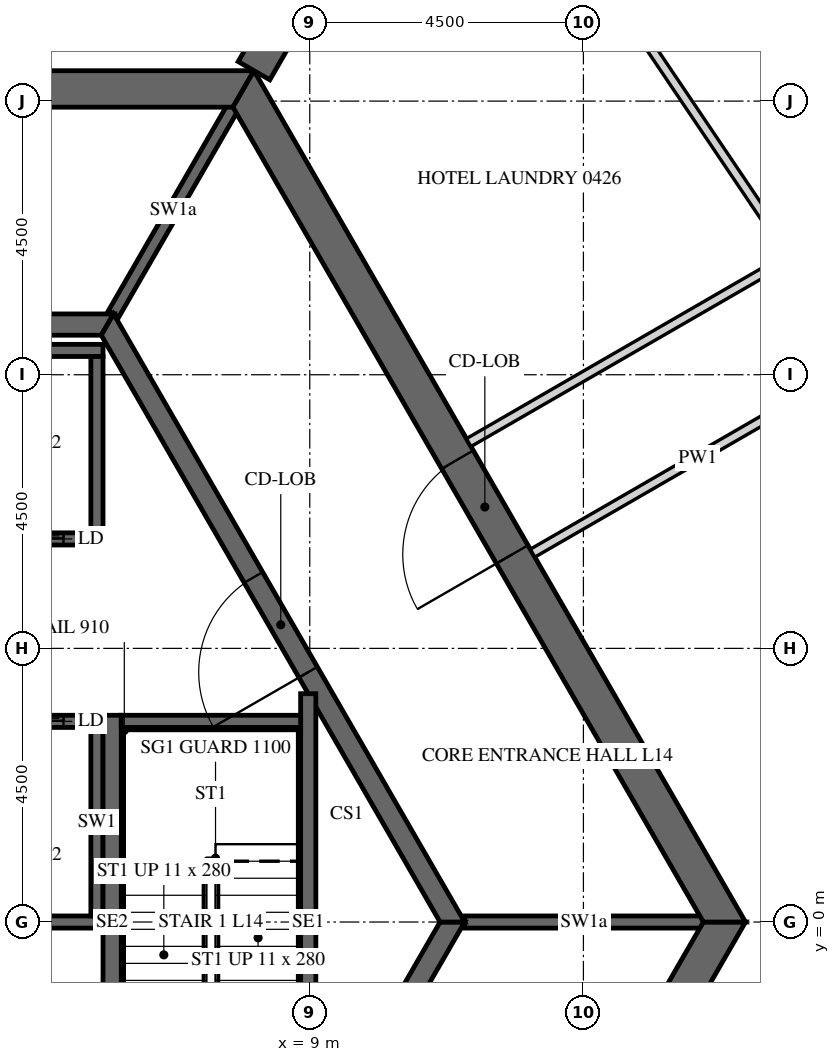
"""IFC4 building model, lengths in metres.
Left out: names, types, materials, properties, quantities, classifications, styles, units other than length and angle.
Written with IfcOpenShell. Run it as: python <this file> out.ifc"""

import sys

from ifc_helpers import new_model, si_unit, direction, frame, frame_2d, origin, place, context, subcontext, project, spatial, polyline, rectangle, outline, extrude, element, fill, save


model = new_model("IFC4")
c1 = context("Model", 3, precision=1e-05, world=origin(), true_north=direction((0.0, 1.0)))
c2 = subcontext(c1, "Body", "Model", "MODEL_VIEW")
j1 = project(units=[si_unit("LENGTHUNIT", "METRE"), si_unit("PLANEANGLEUNIT", "RADIAN")], contexts=[c1])
p1 = place(None, origin())
s1 = spatial("IfcSite", under=j1, at=p1, CompositionType="ELEMENT")
p2 = place(p1, origin())
s2 = spatial("IfcBuilding", under=s1, at=p2, CompositionType="ELEMENT")
p3 = place(p2, frame((0.0, 0.0, 68.7)))
s3 = spatial("IfcBuildingStorey", under=s2, at=p3, CompositionType="ELEMENT", Elevation=68.7)
p4 = place(p3, frame((7.91, -13.7, -0.15), z_axis=(0.0, 0.0, 1.0), x_axis=(0.499999880136, 0.866025472988, 0.0)))
e1 = element("IfcWall", 1, at=p4, inside=s3, PredefinedType="SHEAR", context=c2, shape_type="SweptSolid", body=[
    extrude(outline(polyline([(-0.173, -0.3), (15.993, -0.3), (15.646, 0.3), (0.173, 0.3), (-0.173, -0.3)])), origin(), (0.0, 0.0, 1.0), 3.9),
])
p5 = place(p4, frame((7.039, 0.0, 0.15)))
e2 = element("IfcOpeningElement", 2, at=p5, cuts=e1, PredefinedType="OPENING", context=c2, shape_type="SweptSolid", body=[
    extrude(rectangle(XDim=1.8, YDim=2.4, at=frame_2d((0.9, 1.2))), frame((0.0, 0.31, 0.0), z_axis=(0.0, -1.0, 0.0), x_axis=(1.0, 0.0, 0.0)), (0.0, 0.0, 1.0), 0.62),
])
p6 = place(p3, frame((15.819, 0.0, -0.15), z_axis=(0.0, 0.0, 1.0), x_axis=(-0.499999880136, 0.866025472988, 0.0)))
e3 = element("IfcWall", 3, at=p6, inside=s3, PredefinedType="SHEAR", context=c2, shape_type="SweptSolid", body=[
    extrude(outline(polyline([(-0.173, -0.3), (15.993, -0.3), (15.646, 0.3), (0.173, 0.3), (-0.173, -0.3)])), origin(), (0.0, 0.0, 1.0), 3.9),
])
p7 = place(p6, frame((6.981, 0.0, 0.15)))
e4 = element("IfcOpeningElement", 4, at=p7, cuts=e3, PredefinedType="OPENING", context=c2, shape_type="SweptSolid", body=[
    extrude(rectangle(XDim=1.8, YDim=2.4, at=frame_2d((0.9, 1.2))), frame((0.0, 0.31, 0.0), z_axis=(0.0, -1.0, 0.0), x_axis=(1.0, 0.0, 0.0)), (0.0, 0.0, 1.0), 0.62),
])
p8 = place(p3, frame((7.91, 13.7, -0.15), z_axis=(0.0, 0.0, 1.0), x_axis=(-1.0, 0.0, 0.0)))
e5 = element("IfcWall", 5, at=p8, inside=s3, PredefinedType="SHEAR", context=c2, shape_type="SweptSolid", body=[
    extrude(outline(polyline([(-0.173, -0.3), (15.993, -0.3), (15.646, 0.3), (0.173, 0.3), (-0.173, -0.3)])), origin(), (0.0, 0.0, 1.0), 3.9),
])
p9 = place(p8, frame((7.31, 0.0, 0.15)))
e6 = element("IfcOpeningElement", 6, at=p9, cuts=e5, PredefinedType="OPENING", context=c2, shape_type="SweptSolid", body=[
    extrude(rectangle(XDim=1.2, YDim=2.4, at=frame_2d((0.6, 1.2))), frame((0.0, 0.31, 0.0), z_axis=(0.0, -1.0, 0.0), x_axis=(1.0, 0.0, 0.0)), (0.0, 0.0, 1.0), 0.62),
])
p10 = place(p3, frame((8.083, 14.0, -0.15), z_axis=(0.0, 0.0, 1.0), x_axis=(0.499997680643, 0.866026742862, 0.0)))
e7 = element("IfcWall", 7, at=p10, inside=s3, PredefinedType="SHEAR", context=c2, shape_type="SweptSolid", body=[
    extrude(rectangle(XDim=16.509, YDim=0.6, at=frame_2d((8.254, 0.0))), origin(), (0.0, 0.0, 1.0), 3.9),
])
p11 = place(p10, frame((7.354, 0.0, 0.15)))
e8 = element("IfcOpeningElement", 8, at=p11, cuts=e7, PredefinedType="OPENING", context=c2, shape_type="SweptSolid", body=[
    extrude(rectangle(XDim=1.8, YDim=2.4, at=frame_2d((0.9, 1.2))), frame((0.0, 0.31, 0.0), z_axis=(0.0, -1.0, 0.0), x_axis=(1.0, 0.0, 0.0)), (0.0, 0.0, 1.0), 0.62),
])
p12 = place(p3, frame((5.673, -9.825, -0.15), z_axis=(0.0, 0.0, 1.0), x_axis=(0.499995046907, 0.866028263435, 0.0)))
e9 = element("IfcWall", 9, at=p12, inside=s3, PredefinedType="SHEAR", context=c2, shape_type="SweptSolid", body=[
    extrude(outline(polyline([(-0.101, -0.175), (11.446, -0.175), (11.244, 0.175), (0.101, 0.175), (-0.101, -0.175)])), origin(), (0.0, 0.0, 1.0), 3.9),
])
p13 = place(p12, frame((4.801, 0.0, 0.15)))
e10 = element("IfcOpeningElement", 10, at=p13, cuts=e9, PredefinedType="OPENING", context=c2, shape_type="SweptSolid", body=[
    extrude(rectangle(XDim=1.8, YDim=2.4, at=frame_2d((0.9, 1.2))), frame((0.0, 0.185, 0.0), z_axis=(0.0, -1.0, 0.0), x_axis=(1.0, 0.0, 0.0)), (0.0, 0.0, 1.0), 0.37),
])
p14 = place(p3, frame((11.345, 0.0, -0.15), z_axis=(0.0, 0.0, 1.0), x_axis=(-0.499995046907, 0.866028263435, 0.0)))
e11 = element("IfcWall", 11, at=p14, inside=s3, PredefinedType="SHEAR", context=c2, shape_type="SweptSolid", body=[
    extrude(outline(polyline([(-0.101, -0.175), (11.446, -0.175), (11.244, 0.175), (0.101, 0.175), (-0.101, -0.175)])), origin(), (0.0, 0.0, 1.0), 3.9),
])
p15 = place(p14, frame((4.744, 0.0, 0.15)))
e12 = element("IfcOpeningElement", 12, at=p15, cuts=e11, PredefinedType="OPENING", context=c2, shape_type="SweptSolid", body=[
    extrude(rectangle(XDim=1.8, YDim=2.4, at=frame_2d((0.9, 1.2))), frame((0.0, 0.185, 0.0), z_axis=(0.0, -1.0, 0.0), x_axis=(1.0, 0.0, 0.0)), (0.0, 0.0, 1.0), 0.37),
])
p16 = place(p3, frame((5.673, 9.825, -0.15), z_axis=(0.0, 0.0, 1.0), x_axis=(-1.0, 0.0, 0.0)))
e13 = element("IfcWall", 13, at=p16, inside=s3, PredefinedType="SHEAR", context=c2, shape_type="SweptSolid", body=[
    extrude(outline(polyline([(-0.101, -0.175), (11.446, -0.175), (11.244, 0.175), (0.101, 0.175), (-0.101, -0.175)])), origin(), (0.0, 0.0, 1.0), 3.9),
])
p17 = place(p3, frame((-5.6, 6.3, -0.25), z_axis=(0.0, 0.0, 1.0), x_axis=(1.0, 0.0, 0.0)))
e14 = element("IfcWall", 14, at=p17, inside=s3, PredefinedType="SHEAR", context=c2, shape_type="SweptSolid", body=[
    extrude(rectangle(XDim=11.2, YDim=0.2, at=frame_2d((5.6, 0.0))), origin(), (0.0, 0.0, 1.0), 3.9),
])
p18 = place(p17, frame((0.65, 0.0, 0.25)))
e15 = element("IfcOpeningElement", 15, at=p18, cuts=e14, PredefinedType="OPENING", context=c2, shape_type="SweptSolid", body=[
    extrude(rectangle(XDim=1.1, YDim=2.1, at=frame_2d((0.55, 1.05))), frame((0.0, 0.11, 0.0), z_axis=(0.0, -1.0, 0.0), x_axis=(1.0, 0.0, 0.0)), (0.0, 0.0, 1.0), 0.22),
])
p19 = place(p17, frame((2.85, 0.0, 0.25)))
e16 = element("IfcOpeningElement", 16, at=p19, cuts=e14, PredefinedType="OPENING", context=c2, shape_type="SweptSolid", body=[
    extrude(rectangle(XDim=1.1, YDim=2.1, at=frame_2d((0.55, 1.05))), frame((0.0, 0.11, 0.0), z_axis=(0.0, -1.0, 0.0), x_axis=(1.0, 0.0, 0.0)), (0.0, 0.0, 1.0), 0.22),
])
p20 = place(p17, frame((5.05, 0.0, 0.25)))
e17 = element("IfcOpeningElement", 17, at=p20, cuts=e14, PredefinedType="OPENING", context=c2, shape_type="SweptSolid", body=[
    extrude(rectangle(XDim=1.1, YDim=2.1, at=frame_2d((0.55, 1.05))), frame((0.0, 0.11, 0.0), z_axis=(0.0, -1.0, 0.0), x_axis=(1.0, 0.0, 0.0)), (0.0, 0.0, 1.0), 0.22),
])
p21 = place(p17, frame((7.25, 0.0, 0.25)))
e18 = element("IfcOpeningElement", 18, at=p21, cuts=e14, PredefinedType="OPENING", context=c2, shape_type="SweptSolid", body=[
    extrude(rectangle(XDim=1.1, YDim=2.1, at=frame_2d((0.55, 1.05))), frame((0.0, 0.11, 0.0), z_axis=(0.0, -1.0, 0.0), x_axis=(1.0, 0.0, 0.0)), (0.0, 0.0, 1.0), 0.22),
])
p22 = place(p17, frame((9.45, 0.0, 0.25)))
e19 = element("IfcOpeningElement", 19, at=p22, cuts=e14, PredefinedType="OPENING", context=c2, shape_type="SweptSolid", body=[
    extrude(rectangle(XDim=1.1, YDim=2.1, at=frame_2d((0.55, 1.05))), frame((0.0, 0.11, 0.0), z_axis=(0.0, -1.0, 0.0), x_axis=(1.0, 0.0, 0.0)), (0.0, 0.0, 1.0), 0.22),
])
p23 = place(p3, frame((-5.6, 9.4, -0.25), z_axis=(0.0, 0.0, 1.0), x_axis=(1.0, 0.0, 0.0)))
e20 = element("IfcWall", 20, at=p23, inside=s3, PredefinedType="SHEAR", context=c2, shape_type="SweptSolid", body=[
    extrude(rectangle(XDim=11.2, YDim=0.2, at=frame_2d((5.6, 0.0))), origin(), (0.0, 0.0, 1.0), 3.9),
])
p24 = place(p3, frame((5.5, 6.4, -0.25), z_axis=(0.0, 0.0, 1.0), x_axis=(0.0, 1.0, 0.0)))
e21 = element("IfcWall", 21, at=p24, inside=s3, PredefinedType="SHEAR", context=c2, shape_type="SweptSolid", body=[
    extrude(rectangle(XDim=2.9, YDim=0.2, at=frame_2d((1.45, 0.0))), origin(), (0.0, 0.0, 1.0), 3.9),
])
p25 = place(p3, frame((-5.6, 3.3, -0.25), z_axis=(0.0, 0.0, 1.0), x_axis=(1.0, 0.0, 0.0)))
e22 = element("IfcWall", 22, at=p25, inside=s3, PredefinedType="SHEAR", context=c2, shape_type="SweptSolid", body=[
    extrude(rectangle(XDim=11.2, YDim=0.2, at=frame_2d((5.6, 0.0))), origin(), (0.0, 0.0, 1.0), 3.9),
])
p26 = place(p25, frame((0.65, 0.0, 0.25)))
e23 = element("IfcOpeningElement", 23, at=p26, cuts=e22, PredefinedType="OPENING", context=c2, shape_type="SweptSolid", body=[
    extrude(rectangle(XDim=1.1, YDim=2.1, at=frame_2d((0.55, 1.05))), frame((0.0, 0.11, 0.0), z_axis=(0.0, -1.0, 0.0), x_axis=(1.0, 0.0, 0.0)), (0.0, 0.0, 1.0), 0.22),
])
p27 = place(p25, frame((2.85, 0.0, 0.25)))
e24 = element("IfcOpeningElement", 24, at=p27, cuts=e22, PredefinedType="OPENING", context=c2, shape_type="SweptSolid", body=[
    extrude(rectangle(XDim=1.1, YDim=2.1, at=frame_2d((0.55, 1.05))), frame((0.0, 0.11, 0.0), z_axis=(0.0, -1.0, 0.0), x_axis=(1.0, 0.0, 0.0)), (0.0, 0.0, 1.0), 0.22),
])
p28 = place(p25, frame((5.05, 0.0, 0.25)))
e25 = element("IfcOpeningElement", 25, at=p28, cuts=e22, PredefinedType="OPENING", context=c2, shape_type="SweptSolid", body=[
    extrude(rectangle(XDim=1.1, YDim=2.1, at=frame_2d((0.55, 1.05))), frame((0.0, 0.11, 0.0), z_axis=(0.0, -1.0, 0.0), x_axis=(1.0, 0.0, 0.0)), (0.0, 0.0, 1.0), 0.22),
])
p29 = place(p25, frame((7.25, 0.0, 0.25)))
e26 = element("IfcOpeningElement", 26, at=p29, cuts=e22, PredefinedType="OPENING", context=c2, shape_type="SweptSolid", body=[
    extrude(rectangle(XDim=1.1, YDim=2.1, at=frame_2d((0.55, 1.05))), frame((0.0, 0.11, 0.0), z_axis=(0.0, -1.0, 0.0), x_axis=(1.0, 0.0, 0.0)), (0.0, 0.0, 1.0), 0.22),
])
p30 = place(p25, frame((9.45, 0.0, 0.25)))
e27 = element("IfcOpeningElement", 27, at=p30, cuts=e22, PredefinedType="OPENING", context=c2, shape_type="SweptSolid", body=[
    extrude(rectangle(XDim=1.1, YDim=2.1, at=frame_2d((0.55, 1.05))), frame((0.0, 0.11, 0.0), z_axis=(0.0, -1.0, 0.0), x_axis=(1.0, 0.0, 0.0)), (0.0, 0.0, 1.0), 0.22),
])
p31 = place(p3, frame((-5.6, 0.0, -0.25), z_axis=(0.0, 0.0, 1.0), x_axis=(1.0, 0.0, 0.0)))
e28 = element("IfcWall", 28, at=p31, inside=s3, PredefinedType="SHEAR", context=c2, shape_type="SweptSolid", body=[
    extrude(rectangle(XDim=11.2, YDim=0.2, at=frame_2d((5.6, 0.0))), origin(), (0.0, 0.0, 1.0), 3.9),
])
p32 = place(p3, frame((5.5, 0.1, -0.25), z_axis=(0.0, 0.0, 1.0), x_axis=(0.0, 1.0, 0.0)))
e29 = element("IfcWall", 29, at=p32, inside=s3, PredefinedType="SHEAR", context=c2, shape_type="SweptSolid", body=[
    extrude(rectangle(XDim=3.1, YDim=0.2, at=frame_2d((1.55, 0.0))), origin(), (0.0, 0.0, 1.0), 3.9),
])
p33 = place(p3, frame((11.547, 0.0, -0.15), z_axis=(0.0, 0.0, 1.0), x_axis=(1.0, 0.0, 0.0)))
e30 = element("IfcWall", 30, at=p33, inside=s3, PredefinedType="SHEAR", context=c2, shape_type="SweptSolid", body=[
    extrude(rectangle(XDim=3.926, YDim=0.2, at=frame_2d((1.963, 0.0))), origin(), (0.0, 0.0, 1.0), 3.9),
])
p34 = place(p3, frame((5.773, 10.0, -0.15), z_axis=(0.0, 0.0, 1.0), x_axis=(0.500038251005, 0.86600331843, 0.0)))
e31 = element("IfcWall", 31, at=p34, inside=s3, PredefinedType="SHEAR", context=c2, shape_type="SweptSolid", body=[
    extrude(rectangle(XDim=3.926, YDim=0.2, at=frame_2d((1.963, 0.0))), origin(), (0.0, 0.0, 1.0), 3.9),
])
p35 = place(p3, frame((5.75, -3.4, -0.25), z_axis=(0.0, 0.0, 1.0), x_axis=(0.0, 1.0, 0.0)))
e32 = element("IfcWall", 32, at=p35, inside=s3, PredefinedType="SHEAR", context=c2, shape_type="SweptSolid", body=[
    extrude(rectangle(XDim=6.8, YDim=0.3, at=frame_2d((3.4, 0.0))), origin(), (0.0, 0.0, 1.0), 3.9),
])
p36 = place(p3, frame((8.975, -3.755, -0.25), z_axis=(0.0, 0.0, 1.0), x_axis=(0.0, 1.0, 0.0)))
e33 = element("IfcWall", 33, at=p36, inside=s3, PredefinedType="SHEAR", context=c2, shape_type="SweptSolid", body=[
    extrude(rectangle(XDim=7.51, YDim=0.25, at=frame_2d((3.755, 0.0))), origin(), (0.0, 0.0, 1.0), 3.9),
])
p37 = place(p3, frame((5.9, 3.3, -0.25), z_axis=(0.0, 0.0, 1.0), x_axis=(1.0, 0.0, 0.0)))
e34 = element("IfcWall", 34, at=p37, inside=s3, PredefinedType="SHEAR", context=c2, shape_type="SweptSolid", body=[
    extrude(rectangle(XDim=2.95, YDim=0.2, at=frame_2d((1.475, 0.0))), origin(), (0.0, 0.0, 1.0), 3.9),
])
p38 = place(p3, frame((13.928, -19.775, 0.0), z_axis=(0.0, 0.0, 1.0), x_axis=(0.50000450071, 0.866022805283, 0.0)))
e35 = element("IfcWall", 35, at=p38, inside=s3, PredefinedType="PARTITIONING", context=c2, shape_type="SweptSolid", body=[
    extrude(rectangle(XDim=23.877, YDim=0.15, at=frame_2d((11.938, 0.0))), origin(), (0.0, 0.0, 1.0), 2.988),
])
p39 = place(p38, frame((3.943, 0.0, 0.0)))
e36 = element("IfcOpeningElement", 36, at=p39, cuts=e35, PredefinedType="OPENING", context=c2, shape_type="SweptSolid", body=[
    extrude(rectangle(XDim=1.0, YDim=2.1, at=frame_2d((0.5, 1.05))), frame((0.0, 0.085, 0.0), z_axis=(0.0, -1.0, 0.0), x_axis=(1.0, 0.0, 0.0)), (0.0, 0.0, 1.0), 0.17),
])
p40 = place(p38, frame((14.972, 0.0, 0.0)))
e37 = element("IfcOpeningElement", 37, at=p40, cuts=e35, PredefinedType="OPENING", context=c2, shape_type="SweptSolid", body=[
    extrude(rectangle(XDim=1.0, YDim=2.1, at=frame_2d((0.5, 1.05))), frame((0.0, 0.085, 0.0), z_axis=(0.0, -1.0, 0.0), x_axis=(1.0, 0.0, 0.0)), (0.0, 0.0, 1.0), 0.17),
])
p41 = place(p3, frame((25.821, 0.972, 0.0), z_axis=(0.0, 0.0, 1.0), x_axis=(-0.559193816298, 0.829036956845, 0.0)))
e38 = element("IfcWall", 38, at=p41, inside=s3, PredefinedType="PARTITIONING", context=c2, shape_type="SweptSolid", body=[
    extrude(rectangle(XDim=22.002, YDim=0.15, at=frame_2d((11.001, 0.0))), origin(), (0.0, 0.0, 1.0), 2.988),
])
p42 = place(p41, frame((3.269, 0.0, 0.0)))
e39 = element("IfcOpeningElement", 39, at=p42, cuts=e38, PredefinedType="OPENING", context=c2, shape_type="SweptSolid", body=[
    extrude(rectangle(XDim=1.0, YDim=2.1, at=frame_2d((0.5, 1.05))), frame((0.0, 0.085, 0.0), z_axis=(0.0, -1.0, 0.0), x_axis=(1.0, 0.0, 0.0)), (0.0, 0.0, 1.0), 0.17),
])
p43 = place(p41, frame((13.221, 0.0, 0.0)))
e40 = element("IfcOpeningElement", 40, at=p43, cuts=e38, PredefinedType="OPENING", context=c2, shape_type="SweptSolid", body=[
    extrude(rectangle(XDim=1.0, YDim=2.1, at=frame_2d((0.5, 1.05))), frame((0.0, 0.085, 0.0), z_axis=(0.0, -1.0, 0.0), x_axis=(1.0, 0.0, 0.0)), (0.0, 0.0, 1.0), 0.17),
])
p44 = place(p41, frame((20.852, 0.0, 0.0)))
e41 = element("IfcOpeningElement", 41, at=p44, cuts=e38, PredefinedType="OPENING", context=c2, shape_type="SweptSolid", body=[
    extrude(rectangle(XDim=1.0, YDim=2.1, at=frame_2d((0.5, 1.05))), frame((0.0, 0.085, 0.0), z_axis=(0.0, -1.0, 0.0), x_axis=(1.0, 0.0, 0.0)), (0.0, 0.0, 1.0), 0.17),
])
p45 = place(p3, frame((12.664, 6.066, 0.0), z_axis=(0.0, 0.0, 1.0), x_axis=(0.866036561919, 0.499980673046, 0.0)))
e42 = element("IfcWall", 42, at=p45, inside=s3, PredefinedType="PARTITIONING", context=c2, shape_type="SweptSolid", body=[
    extrude(rectangle(XDim=6.275, YDim=0.15, at=frame_2d((3.137, 0.0))), origin(), (0.0, 0.0, 1.0), 2.988),
])
p46 = place(p3, frame((11.465, 19.037, 0.0), z_axis=(0.0, 0.0, 1.0), x_axis=(0.559196064773, -0.829035440221, 0.0)))
e43 = element("IfcWall", 43, at=p46, inside=s3, PredefinedType="PARTITIONING", context=c2, shape_type="SweptSolid", body=[
    extrude(rectangle(XDim=9.757, YDim=0.15, at=frame_2d((4.878, 0.0))), origin(), (0.0, 0.0, 1.0), 2.988),
])
p47 = place(p46, frame((4.428, 0.0, 0.0)))
e44 = element("IfcOpeningElement", 44, at=p47, cuts=e43, PredefinedType="OPENING", context=c2, shape_type="SweptSolid", body=[
    extrude(rectangle(XDim=0.9, YDim=2.1, at=frame_2d((0.45, 1.05))), frame((0.0, 0.085, 0.0), z_axis=(0.0, -1.0, 0.0), x_axis=(1.0, 0.0, 0.0)), (0.0, 0.0, 1.0), 0.17),
])
p48 = place(p3, frame((16.855, 10.911, 0.0), z_axis=(0.0, 0.0, 1.0), x_axis=(-0.866020343444, -0.500008764664, 0.0)))
e45 = element("IfcWall", 45, at=p48, inside=s3, PredefinedType="PARTITIONING", context=c2, shape_type="SweptSolid", body=[
    extrude(rectangle(XDim=6.053, YDim=0.15, at=frame_2d((3.026, 0.0))), origin(), (0.0, 0.0, 1.0), 2.988),
])
p49 = place(p7, origin())
e46 = element("IfcDoor", 46, at=p49, inside=s3, OperationType="DOUBLE_DOOR_SINGLE_SWING", PredefinedType="DOOR", context=c2, shape_type="SweptSolid", body=[
    extrude(rectangle(XDim=1.8, YDim=2.4, at=frame_2d((0.9, 1.2))), frame((0.0, 0.025, 0.0), z_axis=(0.0, -1.0, 0.0), x_axis=(1.0, 0.0, 0.0)), (0.0, 0.0, 1.0), 0.05),
])
fill(e4, e46)
p50 = place(p15, origin())
e47 = element("IfcDoor", 47, at=p50, inside=s3, OperationType="DOUBLE_DOOR_SINGLE_SWING", PredefinedType="DOOR", context=c2, shape_type="SweptSolid", body=[
    extrude(rectangle(XDim=1.8, YDim=2.4, at=frame_2d((0.9, 1.2))), frame((0.0, 0.025, 0.0), z_axis=(0.0, -1.0, 0.0), x_axis=(1.0, 0.0, 0.0)), (0.0, 0.0, 1.0), 0.05),
])
fill(e12, e47)
p51 = place(p22, origin())
e48 = element("IfcDoor", 48, at=p51, inside=s3, OperationType="SLIDING_TO_LEFT", PredefinedType="DOOR", context=c2, shape_type="SweptSolid", body=[
    extrude(rectangle(XDim=1.1, YDim=2.1, at=frame_2d((0.55, 1.05))), frame((0.0, 0.025, 0.0), z_axis=(0.0, -1.0, 0.0), x_axis=(1.0, 0.0, 0.0)), (0.0, 0.0, 1.0), 0.05),
])
fill(e19, e48)
p52 = place(p30, origin())
e49 = element("IfcDoor", 49, at=p52, inside=s3, OperationType="SLIDING_TO_LEFT", PredefinedType="DOOR", context=c2, shape_type="SweptSolid", body=[
    extrude(rectangle(XDim=1.1, YDim=2.1, at=frame_2d((0.55, 1.05))), frame((0.0, 0.025, 0.0), z_axis=(0.0, -1.0, 0.0), x_axis=(1.0, 0.0, 0.0)), (0.0, 0.0, 1.0), 0.05),
])
fill(e27, e49)
save(model, sys.argv[1])
